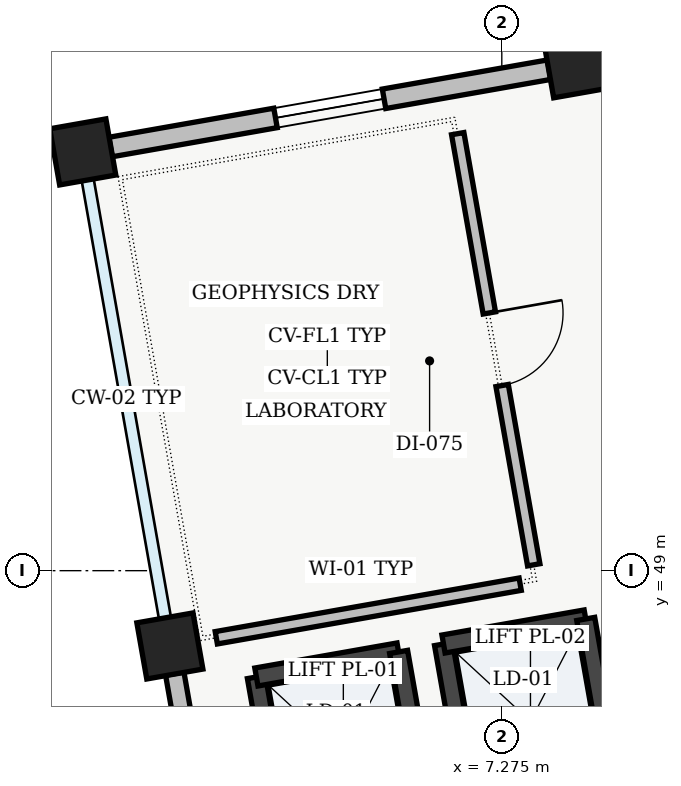
"""IFC4 building model, lengths in metres.
Left out: names, types, materials, properties, quantities, classifications, styles, units other than length and angle.
Written with IfcOpenShell. Run it as: python <this file> out.ifc"""

import sys

from ifc_helpers import new_model, si_unit, direction, frame, frame_2d, origin, origin_2d, place, context, subcontext, project, spatial, rectangle, extrude, element, fill, save


model = new_model("IFC4")
c1 = context("Model", 3, precision=1e-05, world=origin(), true_north=direction((0.0, 1.0)))
c2 = subcontext(c1, "Body", "Model", "MODEL_VIEW")
j1 = project(units=[si_unit("LENGTHUNIT", "METRE"), si_unit("PLANEANGLEUNIT", "RADIAN")], contexts=[c1])
p1 = place(None, origin())
s1 = spatial("IfcSite", under=j1, at=p1, CompositionType="ELEMENT")
p2 = place(p1, origin())
s2 = spatial("IfcBuilding", under=s1, at=p2, CompositionType="ELEMENT")
p3 = place(p2, frame((0.0, 0.0, 5.1)))
s3 = spatial("IfcBuildingStorey", under=s2, at=p3, CompositionType="ELEMENT", Elevation=5.1)
for number, where, z_axis, x_axis in (
    (1, (2.908, 48.01, 0.0), (0.0, 0.0, 1.0), (0.985, 0.174, 0.0)),
    (2, (1.762, 54.509, 0.0), (0.0, 0.0, 1.0), (0.985, 0.174, 0.0)),
    (3, (8.261, 55.655, 0.0), (0.0, 0.0, 1.0), (0.985, 0.174, 0.0)),
):
    element("IfcColumn", number, at=place(p3, frame(where, z_axis=z_axis, x_axis=x_axis)), inside=s3, PredefinedType="COLUMN", context=c2, shape_type="SweptSolid", body=[
        extrude(rectangle(XDim=0.75, YDim=0.75, at=origin_2d()), origin(), (0.0, 0.0, 1.0), 4.31),
    ])
p4 = place(p3, frame((3.99, 41.874, 0.0), z_axis=(0.0, 0.0, 1.0), x_axis=(-0.1736474839, 0.984807875342, 0.0)))
e4 = element("IfcWall", 4, at=p4, inside=s3, PredefinedType="STANDARD", context=c2, shape_type="SweptSolid", body=[
    extrude(rectangle(XDim=5.86, YDim=0.245, at=frame_2d((2.93, 0.0))), origin(), (0.0, 0.0, 1.0), 3.795),
])
p5 = place(p4, frame((1.805, 0.0, 0.95)))
e5 = element("IfcOpeningElement", 5, at=p5, cuts=e4, PredefinedType="OPENING", context=c2, shape_type="SweptSolid", body=[
    extrude(rectangle(XDim=2.25, YDim=1.55, at=frame_2d((1.125, 0.775))), frame((0.0, 0.123, 0.0), z_axis=(0.0, -1.0, 0.0), x_axis=(1.0, 0.0, 0.0)), (0.0, 0.0, 1.0), 0.245),
])
p6 = place(p3, frame((2.126, 54.573, 0.0), z_axis=(0.0, 0.0, 1.0), x_axis=(0.984807875342, 0.1736474839, 0.0)))
e6 = element("IfcWall", 6, at=p6, inside=s3, PredefinedType="STANDARD", context=c2, shape_type="SweptSolid", body=[
    extrude(rectangle(XDim=5.86, YDim=0.26, at=frame_2d((2.93, 0.0))), origin(), (0.0, 0.0, 1.0), 3.795),
])
p7 = place(p6, frame((2.205, 0.0, 0.95)))
e7 = element("IfcOpeningElement", 7, at=p7, cuts=e6, PredefinedType="OPENING", context=c2, shape_type="SweptSolid", body=[
    extrude(rectangle(XDim=1.45, YDim=1.35, at=frame_2d((0.725, 0.675))), frame((0.0, 0.13, 0.0), z_axis=(0.0, -1.0, 0.0), x_axis=(1.0, 0.0, 0.0)), (0.0, 0.0, 1.0), 0.26),
])
p8 = place(p3, frame((4.463, 45.237, 0.0), z_axis=(0.0, 0.0, 1.0), x_axis=(-0.173646056486, 0.984808127031, 0.0)))
e8 = element("IfcWall", 8, at=p8, inside=s3, PredefinedType="SHEAR", context=c2, shape_type="SweptSolid", body=[
    extrude(rectangle(XDim=2.4, YDim=0.24, at=frame_2d((1.2, 0.0))), origin(), (0.0, 0.0, 1.0), 4.28),
])
p9 = place(p3, frame((4.046, 47.601, 0.0), z_axis=(0.0, 0.0, 1.0), x_axis=(0.984793905749, 0.173726691098, 0.0)))
e9 = element("IfcWall", 9, at=p9, inside=s3, PredefinedType="SHEAR", context=c2, shape_type="SweptSolid", body=[
    extrude(rectangle(XDim=1.9, YDim=0.24, at=frame_2d((0.95, 0.0))), origin(), (0.0, 0.0, 1.0), 4.28),
])
for number, where, z_axis, x_axis in (
    (10, (5.917, 47.931, 0.0), (0.0, 0.0, 1.0), (0.174, -0.985, 0.0)),
    (11, (6.925, 45.671, 0.0), (0.0, 0.0, 1.0), (-0.174, 0.985, 0.0)),
):
    element("IfcWall", number, at=place(p3, frame(where, z_axis=z_axis, x_axis=x_axis)), inside=s3, PredefinedType="SHEAR", context=c2, shape_type="SweptSolid", body=[
        extrude(rectangle(XDim=2.4, YDim=0.24, at=frame_2d((1.2, 0.0))), origin(), (0.0, 0.0, 1.0), 4.28),
    ])
p10 = place(p3, frame((6.508, 48.035, 0.0), z_axis=(0.0, 0.0, 1.0), x_axis=(0.984793905749, 0.173726691098, 0.0)))
e12 = element("IfcWall", 12, at=p10, inside=s3, PredefinedType="SHEAR", context=c2, shape_type="SweptSolid", body=[
    extrude(rectangle(XDim=1.9, YDim=0.24, at=frame_2d((0.95, 0.0))), origin(), (0.0, 0.0, 1.0), 4.28),
])
p11 = place(p3, frame((8.379, 48.365, 0.0), z_axis=(0.0, 0.0, 1.0), x_axis=(0.173646056486, -0.984808127031, 0.0)))
e13 = element("IfcWall", 13, at=p11, inside=s3, PredefinedType="SHEAR", context=c2, shape_type="SweptSolid", body=[
    extrude(rectangle(XDim=2.4, YDim=0.24, at=frame_2d((1.2, 0.0))), origin(), (0.0, 0.0, 1.0), 4.28),
])
p12 = place(p3, frame((3.518, 48.117, 0.0), z_axis=(0.0, 0.0, 1.0), x_axis=(0.984816834462, 0.173596666326, 0.0)))
e14 = element("IfcWall", 14, at=p12, inside=s3, PredefinedType="PARTITIONING", context=c2, shape_type="SweptSolid", body=[
    extrude(rectangle(XDim=4.06, YDim=0.165, at=frame_2d((2.03, 0.0))), origin(), (0.0, 0.0, 1.0), 3.645),
])
p13 = place(p3, frame((7.695, 49.077, 0.0), z_axis=(0.0, 0.0, 1.0), x_axis=(-0.173649928941, 0.984807444214, 0.0)))
e15 = element("IfcWall", 15, at=p13, inside=s3, PredefinedType="PARTITIONING", context=c2, shape_type="SweptSolid", body=[
    extrude(rectangle(XDim=5.76, YDim=0.165, at=frame_2d((2.88, 0.0))), origin(), (0.0, 0.0, 1.0), 3.95),
])
p14 = place(p13, frame((2.395, 0.0, 0.0)))
e16 = element("IfcOpeningElement", 16, at=p14, cuts=e15, PredefinedType="OPENING", context=c2, shape_type="SweptSolid", body=[
    extrude(rectangle(XDim=0.97, YDim=2.12, at=frame_2d((0.485, 1.06))), frame((0.0, 0.083, 0.0), z_axis=(0.0, -1.0, 0.0), x_axis=(1.0, 0.0, 0.0)), (0.0, 0.0, 1.0), 0.165),
])
p15 = place(p7, origin())
e17 = element("IfcWindow", 17, at=p15, inside=s3, PartitioningType="SINGLE_PANEL", PredefinedType="WINDOW", context=c2, shape_type="SweptSolid", body=[
    extrude(rectangle(XDim=1.45, YDim=1.35, at=frame_2d((0.725, 0.675))), frame((0.0, 0.03, 0.0), z_axis=(0.0, -1.0, 0.0), x_axis=(1.0, 0.0, 0.0)), (0.0, 0.0, 1.0), 0.06),
])
fill(e7, e17)
p16 = place(p14, origin())
e18 = element("IfcDoor", 18, at=p16, inside=s3, OperationType="SINGLE_SWING_RIGHT", PredefinedType="DOOR", context=c2, shape_type="SweptSolid", body=[
    extrude(rectangle(XDim=0.97, YDim=2.12, at=frame_2d((0.485, 1.06))), frame((0.0, 0.025, 0.0), z_axis=(0.0, -1.0, 0.0), x_axis=(1.0, 0.0, 0.0)), (0.0, 0.0, 1.0), 0.05),
])
fill(e16, e18)
save(model, sys.argv[1])
